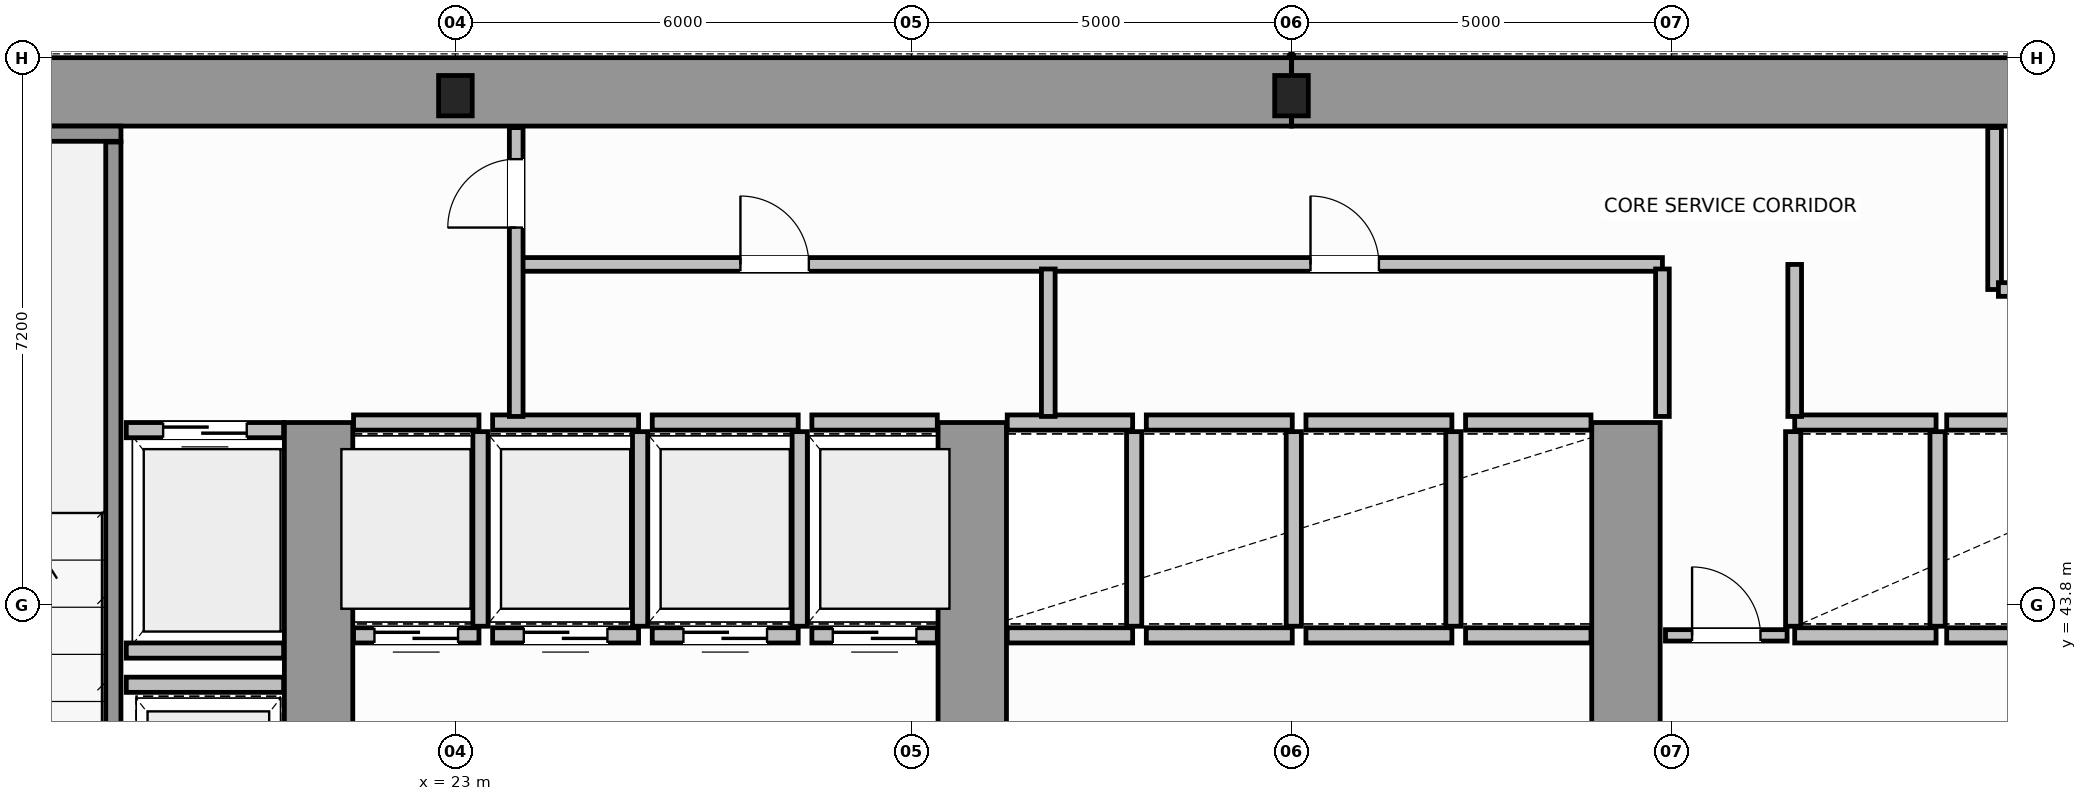
"""IFC4 building model, lengths in metres.
Left out: names, types, materials, properties, quantities, classifications, styles, units other than length and angle.
Written with IfcOpenShell. Run it as: python <this file> out.ifc"""

import sys

from ifc_helpers import new_model, si_unit, direction, frame, frame_2d, origin, origin_2d, place, context, subcontext, project, spatial, rectangle, i_section, extrude, source, transform, mapped, element, fill, save


model = new_model("IFC4")
c1 = context("Model", 3, precision=1e-05, world=origin(), true_north=direction((0.0, 1.0)))
c2 = subcontext(c1, "Body", "Model", "MODEL_VIEW")
j1 = project(units=[si_unit("LENGTHUNIT", "METRE"), si_unit("PLANEANGLEUNIT", "RADIAN")], contexts=[c1])
p1 = place(None, origin())
s1 = spatial("IfcSite", under=j1, at=p1, CompositionType="ELEMENT")
p2 = place(p1, origin())
s2 = spatial("IfcBuilding", under=s1, at=p2, CompositionType="ELEMENT")
p3 = place(p2, frame((0.0, 0.0, 75.8)))
s3 = spatial("IfcBuildingStorey", under=s2, at=p3, CompositionType="ELEMENT", Elevation=75.8)
m1 = source(origin(), c2, "Body", "SweptSolid", [
    extrude(i_section(OverallWidth=0.442, OverallDepth=0.531, WebThickness=0.065, FlangeThickness=0.076, FilletRadius=0.015, at=origin_2d()), origin(), (0.0, 0.0, 1.0), 3.8),
])
for number, where, z_axis, x_axis in (
    (1, (23.0, 50.5, 0.0), (0.0, 0.0, 1.0), (1.0, 0.0, 0.0)),
    (2, (34.0, 50.5, 0.0), (0.0, 0.0, 1.0), (1.0, 0.0, 0.0)),
):
    element("IfcColumn", number, at=place(p3, frame(where, z_axis=z_axis, x_axis=x_axis)), inside=s3, PredefinedType="COLUMN", context=c2, shape_type="MappedRepresentation", body=[
        mapped(m1, transform((0.0, 0.0, 0.0), scale=1.0)),
    ])
for number, where, z_axis, x_axis in (
    (3, (14.454, 50.55, 0.0), (0.0, 0.0, 1.0), (1.0, 0.0, 0.0)),
    (4, (34.002, 50.55, 0.0), (0.0, 0.0, 1.0), (1.0, 0.0, 0.0)),
):
    element("IfcWall", number, at=place(p3, frame(where, z_axis=z_axis, x_axis=x_axis)), inside=s3, PredefinedType="SHEAR", context=c2, shape_type="SweptSolid", body=[
        extrude(rectangle(XDim=19.544, YDim=0.9, at=frame_2d((9.772, 0.0))), origin(), (0.0, 0.0, 1.0), 3.8),
    ])
for number, where, z_axis, x_axis in (
    (5, (21.2, 36.97, 0.0), (0.0, 0.0, 1.0), (0.0, 1.0, 0.0)),
    (6, (29.8, 36.97, 0.0), (0.0, 0.0, 1.0), (0.0, 1.0, 0.0)),
    (7, (38.4, 36.97, 0.0), (0.0, 0.0, 1.0), (0.0, 1.0, 0.0)),
):
    element("IfcWall", number, at=place(p3, frame(where, z_axis=z_axis, x_axis=x_axis)), inside=s3, PredefinedType="SHEAR", context=c2, shape_type="SweptSolid", body=[
        extrude(rectangle(XDim=9.23, YDim=0.9, at=frame_2d((4.615, 0.0))), origin(), (0.0, 0.0, 1.0), 3.8),
    ])
p4 = place(p3, frame((14.45, 50.0, 0.0), z_axis=(0.0, 0.0, 1.0), x_axis=(1.0, 0.0, 0.0)))
e8 = element("IfcWall", 8, at=p4, inside=s3, PredefinedType="SOLIDWALL", context=c2, shape_type="SweptSolid", body=[
    extrude(rectangle(XDim=4.15, YDim=0.2, at=frame_2d((2.075, 0.0))), origin(), (0.0, 0.0, 1.0), 3.8),
])
p5 = place(p3, frame((18.5, 39.96, 0.0), z_axis=(0.0, 0.0, 1.0), x_axis=(0.0, 1.0, 0.0)))
e9 = element("IfcWall", 9, at=p5, inside=s3, PredefinedType="SOLIDWALL", context=c2, shape_type="SweptSolid", body=[
    extrude(rectangle(XDim=9.93, YDim=0.2, at=frame_2d((4.965, 0.0))), origin(), (0.0, 0.0, 1.0), 3.8),
])
p6 = place(p3, frame((21.66, 43.4, 0.0), z_axis=(0.0, 0.0, 1.0), x_axis=(1.0, 0.0, 0.0)))
e10 = element("IfcWall", 10, at=p6, inside=s3, PredefinedType="SOLIDWALL", context=c2, shape_type="SweptSolid", body=[
    extrude(rectangle(XDim=1.65, YDim=0.2, at=frame_2d((0.825, 0.0))), origin(), (0.0, 0.0, 1.0), 3.58),
])
p7 = place(p6, frame((0.275, 0.0, 0.0)))
e11 = element("IfcOpeningElement", 11, at=p7, cuts=e10, PredefinedType="OPENING", context=c2, shape_type="SweptSolid", body=[
    extrude(rectangle(XDim=1.1, YDim=2.15, at=frame_2d((0.55, 1.075))), frame((0.0, 0.11, 0.0), z_axis=(0.0, -1.0, 0.0), x_axis=(1.0, 0.0, 0.0)), (0.0, 0.0, 1.0), 0.22),
])
p8 = place(p3, frame((21.66, 46.2, 0.0), z_axis=(0.0, 0.0, 1.0), x_axis=(1.0, 0.0, 0.0)))
e12 = element("IfcWall", 12, at=p8, inside=s3, PredefinedType="SOLIDWALL", context=c2, shape_type="SweptSolid", body=[
    extrude(rectangle(XDim=1.65, YDim=0.2, at=frame_2d((0.825, 0.0))), origin(), (0.0, 0.0, 1.0), 3.58),
])
p9 = place(p3, frame((23.33, 43.52, 0.0), z_axis=(0.0, 0.0, 1.0), x_axis=(0.0, 1.0, 0.0)))
e13 = element("IfcWall", 13, at=p9, inside=s3, PredefinedType="SOLIDWALL", context=c2, shape_type="SweptSolid", body=[
    extrude(rectangle(XDim=2.56, YDim=0.2, at=frame_2d((1.28, 0.0))), origin(), (0.0, 0.0, 1.0), 3.58),
])
p10 = place(p3, frame((23.49, 43.4, 0.0), z_axis=(0.0, 0.0, 1.0), x_axis=(1.0, 0.0, 0.0)))
e14 = element("IfcWall", 14, at=p10, inside=s3, PredefinedType="SOLIDWALL", context=c2, shape_type="SweptSolid", body=[
    extrude(rectangle(XDim=1.92, YDim=0.2, at=frame_2d((0.96, 0.0))), origin(), (0.0, 0.0, 1.0), 3.58),
])
p11 = place(p10, frame((0.41, 0.0, 0.0)))
e15 = element("IfcOpeningElement", 15, at=p11, cuts=e14, PredefinedType="OPENING", context=c2, shape_type="SweptSolid", body=[
    extrude(rectangle(XDim=1.1, YDim=2.15, at=frame_2d((0.55, 1.075))), frame((0.0, 0.11, 0.0), z_axis=(0.0, -1.0, 0.0), x_axis=(1.0, 0.0, 0.0)), (0.0, 0.0, 1.0), 0.22),
])
p12 = place(p3, frame((23.49, 46.2, 0.0), z_axis=(0.0, 0.0, 1.0), x_axis=(1.0, 0.0, 0.0)))
e16 = element("IfcWall", 16, at=p12, inside=s3, PredefinedType="SOLIDWALL", context=c2, shape_type="SweptSolid", body=[
    extrude(rectangle(XDim=1.92, YDim=0.2, at=frame_2d((0.96, 0.0))), origin(), (0.0, 0.0, 1.0), 3.58),
])
p13 = place(p3, frame((25.43, 43.52, 0.0), z_axis=(0.0, 0.0, 1.0), x_axis=(0.0, 1.0, 0.0)))
e17 = element("IfcWall", 17, at=p13, inside=s3, PredefinedType="SOLIDWALL", context=c2, shape_type="SweptSolid", body=[
    extrude(rectangle(XDim=2.56, YDim=0.2, at=frame_2d((1.28, 0.0))), origin(), (0.0, 0.0, 1.0), 3.58),
])
p14 = place(p3, frame((25.59, 43.4, 0.0), z_axis=(0.0, 0.0, 1.0), x_axis=(1.0, 0.0, 0.0)))
e18 = element("IfcWall", 18, at=p14, inside=s3, PredefinedType="SOLIDWALL", context=c2, shape_type="SweptSolid", body=[
    extrude(rectangle(XDim=1.92, YDim=0.2, at=frame_2d((0.96, 0.0))), origin(), (0.0, 0.0, 1.0), 3.58),
])
p15 = place(p14, frame((0.41, 0.0, 0.0)))
e19 = element("IfcOpeningElement", 19, at=p15, cuts=e18, PredefinedType="OPENING", context=c2, shape_type="SweptSolid", body=[
    extrude(rectangle(XDim=1.1, YDim=2.15, at=frame_2d((0.55, 1.075))), frame((0.0, 0.11, 0.0), z_axis=(0.0, -1.0, 0.0), x_axis=(1.0, 0.0, 0.0)), (0.0, 0.0, 1.0), 0.22),
])
p16 = place(p3, frame((25.59, 46.2, 0.0), z_axis=(0.0, 0.0, 1.0), x_axis=(1.0, 0.0, 0.0)))
e20 = element("IfcWall", 20, at=p16, inside=s3, PredefinedType="SOLIDWALL", context=c2, shape_type="SweptSolid", body=[
    extrude(rectangle(XDim=1.92, YDim=0.2, at=frame_2d((0.96, 0.0))), origin(), (0.0, 0.0, 1.0), 3.58),
])
p17 = place(p3, frame((27.53, 43.52, 0.0), z_axis=(0.0, 0.0, 1.0), x_axis=(0.0, 1.0, 0.0)))
e21 = element("IfcWall", 21, at=p17, inside=s3, PredefinedType="SOLIDWALL", context=c2, shape_type="SweptSolid", body=[
    extrude(rectangle(XDim=2.56, YDim=0.2, at=frame_2d((1.28, 0.0))), origin(), (0.0, 0.0, 1.0), 3.58),
])
p18 = place(p3, frame((27.69, 43.4, 0.0), z_axis=(0.0, 0.0, 1.0), x_axis=(1.0, 0.0, 0.0)))
e22 = element("IfcWall", 22, at=p18, inside=s3, PredefinedType="SOLIDWALL", context=c2, shape_type="SweptSolid", body=[
    extrude(rectangle(XDim=1.65, YDim=0.2, at=frame_2d((0.825, 0.0))), origin(), (0.0, 0.0, 1.0), 3.58),
])
p19 = place(p18, frame((0.275, 0.0, 0.0)))
e23 = element("IfcOpeningElement", 23, at=p19, cuts=e22, PredefinedType="OPENING", context=c2, shape_type="SweptSolid", body=[
    extrude(rectangle(XDim=1.1, YDim=2.15, at=frame_2d((0.55, 1.075))), frame((0.0, 0.11, 0.0), z_axis=(0.0, -1.0, 0.0), x_axis=(1.0, 0.0, 0.0)), (0.0, 0.0, 1.0), 0.22),
])
p20 = place(p3, frame((27.69, 46.2, 0.0), z_axis=(0.0, 0.0, 1.0), x_axis=(1.0, 0.0, 0.0)))
e24 = element("IfcWall", 24, at=p20, inside=s3, PredefinedType="SOLIDWALL", context=c2, shape_type="SweptSolid", body=[
    extrude(rectangle(XDim=1.65, YDim=0.2, at=frame_2d((0.825, 0.0))), origin(), (0.0, 0.0, 1.0), 3.58),
])
for number, where, z_axis, x_axis in (
    (25, (30.26, 43.4, 0.0), (0.0, 0.0, 1.0), (1.0, 0.0, 0.0)),
    (26, (30.26, 46.2, 0.0), (0.0, 0.0, 1.0), (1.0, 0.0, 0.0)),
):
    element("IfcWall", number, at=place(p3, frame(where, z_axis=z_axis, x_axis=x_axis)), inside=s3, PredefinedType="SOLIDWALL", context=c2, shape_type="SweptSolid", body=[
        extrude(rectangle(XDim=1.65, YDim=0.2, at=frame_2d((0.825, 0.0))), origin(), (0.0, 0.0, 1.0), 3.58),
    ])
p21 = place(p3, frame((31.93, 43.52, 0.0), z_axis=(0.0, 0.0, 1.0), x_axis=(0.0, 1.0, 0.0)))
e27 = element("IfcWall", 27, at=p21, inside=s3, PredefinedType="SOLIDWALL", context=c2, shape_type="SweptSolid", body=[
    extrude(rectangle(XDim=2.56, YDim=0.2, at=frame_2d((1.28, 0.0))), origin(), (0.0, 0.0, 1.0), 3.58),
])
for number, where, z_axis, x_axis in (
    (28, (32.09, 43.4, 0.0), (0.0, 0.0, 1.0), (1.0, 0.0, 0.0)),
    (29, (32.09, 46.2, 0.0), (0.0, 0.0, 1.0), (1.0, 0.0, 0.0)),
):
    element("IfcWall", number, at=place(p3, frame(where, z_axis=z_axis, x_axis=x_axis)), inside=s3, PredefinedType="SOLIDWALL", context=c2, shape_type="SweptSolid", body=[
        extrude(rectangle(XDim=1.92, YDim=0.2, at=frame_2d((0.96, 0.0))), origin(), (0.0, 0.0, 1.0), 3.58),
    ])
p22 = place(p3, frame((34.03, 43.52, 0.0), z_axis=(0.0, 0.0, 1.0), x_axis=(0.0, 1.0, 0.0)))
e30 = element("IfcWall", 30, at=p22, inside=s3, PredefinedType="SOLIDWALL", context=c2, shape_type="SweptSolid", body=[
    extrude(rectangle(XDim=2.56, YDim=0.2, at=frame_2d((1.28, 0.0))), origin(), (0.0, 0.0, 1.0), 3.58),
])
for number, where, z_axis, x_axis in (
    (31, (34.19, 43.4, 0.0), (0.0, 0.0, 1.0), (1.0, 0.0, 0.0)),
    (32, (34.19, 46.2, 0.0), (0.0, 0.0, 1.0), (1.0, 0.0, 0.0)),
):
    element("IfcWall", number, at=place(p3, frame(where, z_axis=z_axis, x_axis=x_axis)), inside=s3, PredefinedType="SOLIDWALL", context=c2, shape_type="SweptSolid", body=[
        extrude(rectangle(XDim=1.92, YDim=0.2, at=frame_2d((0.96, 0.0))), origin(), (0.0, 0.0, 1.0), 3.58),
    ])
p23 = place(p3, frame((36.13, 43.52, 0.0), z_axis=(0.0, 0.0, 1.0), x_axis=(0.0, 1.0, 0.0)))
e33 = element("IfcWall", 33, at=p23, inside=s3, PredefinedType="SOLIDWALL", context=c2, shape_type="SweptSolid", body=[
    extrude(rectangle(XDim=2.56, YDim=0.2, at=frame_2d((1.28, 0.0))), origin(), (0.0, 0.0, 1.0), 3.58),
])
for number, where, z_axis, x_axis in (
    (34, (36.29, 43.4, 0.0), (0.0, 0.0, 1.0), (1.0, 0.0, 0.0)),
    (35, (36.29, 46.2, 0.0), (0.0, 0.0, 1.0), (1.0, 0.0, 0.0)),
):
    element("IfcWall", number, at=place(p3, frame(where, z_axis=z_axis, x_axis=x_axis)), inside=s3, PredefinedType="SOLIDWALL", context=c2, shape_type="SweptSolid", body=[
        extrude(rectangle(XDim=1.65, YDim=0.2, at=frame_2d((0.825, 0.0))), origin(), (0.0, 0.0, 1.0), 3.58),
    ])
for number, where, z_axis, x_axis in (
    (36, (40.62, 43.4, 0.0), (0.0, 0.0, 1.0), (1.0, 0.0, 0.0)),
    (37, (40.62, 46.2, 0.0), (0.0, 0.0, 1.0), (1.0, 0.0, 0.0)),
):
    element("IfcWall", number, at=place(p3, frame(where, z_axis=z_axis, x_axis=x_axis)), inside=s3, PredefinedType="SOLIDWALL", context=c2, shape_type="SweptSolid", body=[
        extrude(rectangle(XDim=1.86, YDim=0.2, at=frame_2d((0.93, 0.0))), origin(), (0.0, 0.0, 1.0), 3.58),
    ])
for number, where, z_axis, x_axis in (
    (38, (40.6, 43.52, 0.0), (0.0, 0.0, 1.0), (0.0, 1.0, 0.0)),
    (39, (42.5, 43.52, 0.0), (0.0, 0.0, 1.0), (0.0, 1.0, 0.0)),
):
    element("IfcWall", number, at=place(p3, frame(where, z_axis=z_axis, x_axis=x_axis)), inside=s3, PredefinedType="SOLIDWALL", context=c2, shape_type="SweptSolid", body=[
        extrude(rectangle(XDim=2.56, YDim=0.2, at=frame_2d((1.28, 0.0))), origin(), (0.0, 0.0, 1.0), 3.58),
    ])
for number, where, z_axis, x_axis in (
    (40, (42.62, 43.4, 0.0), (0.0, 0.0, 1.0), (1.0, 0.0, 0.0)),
    (41, (42.62, 46.2, 0.0), (0.0, 0.0, 1.0), (1.0, 0.0, 0.0)),
):
    element("IfcWall", number, at=place(p3, frame(where, z_axis=z_axis, x_axis=x_axis)), inside=s3, PredefinedType="SOLIDWALL", context=c2, shape_type="SweptSolid", body=[
        extrude(rectangle(XDim=1.86, YDim=0.2, at=frame_2d((0.93, 0.0))), origin(), (0.0, 0.0, 1.0), 3.58),
    ])
p24 = place(p3, frame((18.67, 46.1, 0.0), z_axis=(0.0, 0.0, 1.0), x_axis=(1.0, 0.0, 0.0)))
e42 = element("IfcWall", 42, at=p24, inside=s3, PredefinedType="SOLIDWALL", context=c2, shape_type="SweptSolid", body=[
    extrude(rectangle(XDim=2.07, YDim=0.2, at=frame_2d((1.035, 0.0))), origin(), (0.0, 0.0, 1.0), 3.58),
])
p25 = place(p24, frame((0.485, 0.0, 0.0)))
e43 = element("IfcOpeningElement", 43, at=p25, cuts=e42, PredefinedType="OPENING", context=c2, shape_type="SweptSolid", body=[
    extrude(rectangle(XDim=1.1, YDim=2.15, at=frame_2d((0.55, 1.075))), frame((0.0, 0.11, 0.0), z_axis=(0.0, -1.0, 0.0), x_axis=(1.0, 0.0, 0.0)), (0.0, 0.0, 1.0), 0.22),
])
for number, where, z_axis, x_axis in (
    (44, (18.67, 43.2, 0.0), (0.0, 0.0, 1.0), (1.0, 0.0, 0.0)),
    (45, (18.67, 42.75, 0.0), (0.0, 0.0, 1.0), (1.0, 0.0, 0.0)),
):
    element("IfcWall", number, at=place(p3, frame(where, z_axis=z_axis, x_axis=x_axis)), inside=s3, PredefinedType="SOLIDWALL", context=c2, shape_type="SweptSolid", body=[
        extrude(rectangle(XDim=2.07, YDim=0.2, at=frame_2d((1.035, 0.0))), origin(), (0.0, 0.0, 1.0), 3.58),
    ])
p26 = place(p3, frame((38.92, 43.4, 0.0), z_axis=(0.0, 0.0, 1.0), x_axis=(1.0, 0.0, 0.0)))
e46 = element("IfcWall", 46, at=p26, inside=s3, PredefinedType="PARTITIONING", context=c2, shape_type="SweptSolid", body=[
    extrude(rectangle(XDim=1.6, YDim=0.15, at=frame_2d((0.8, 0.0))), origin(), (0.0, 0.0, 1.0), 3.58),
])
p27 = place(p26, frame((0.35, 0.0, 0.0)))
e47 = element("IfcOpeningElement", 47, at=p27, cuts=e46, PredefinedType="OPENING", context=c2, shape_type="SweptSolid", body=[
    extrude(rectangle(XDim=0.9, YDim=2.1, at=frame_2d((0.45, 1.05))), frame((0.0, 0.085, 0.0), z_axis=(0.0, -1.0, 0.0), x_axis=(1.0, 0.0, 0.0)), (0.0, 0.0, 1.0), 0.17),
])
p28 = place(p3, frame((23.85, 48.28, 0.0), z_axis=(0.0, 0.0, 1.0), x_axis=(1.0, 0.0, 0.0)))
e48 = element("IfcWall", 48, at=p28, inside=s3, PredefinedType="PLUMBINGWALL", context=c2, shape_type="SweptSolid", body=[
    extrude(rectangle(XDim=15.03, YDim=0.18, at=frame_2d((7.515, 0.0))), origin(), (0.0, 0.0, 1.0), 3.58),
])
p29 = place(p28, frame((2.9, 0.0, 0.0)))
e49 = element("IfcOpeningElement", 49, at=p29, cuts=e48, PredefinedType="OPENING", context=c2, shape_type="SweptSolid", body=[
    extrude(rectangle(XDim=0.9, YDim=2.15, at=frame_2d((0.45, 1.075))), frame((0.0, 0.1, 0.0), z_axis=(0.0, -1.0, 0.0), x_axis=(1.0, 0.0, 0.0)), (0.0, 0.0, 1.0), 0.2),
])
p30 = place(p28, frame((10.4, 0.0, 0.0)))
e50 = element("IfcOpeningElement", 50, at=p30, cuts=e48, PredefinedType="OPENING", context=c2, shape_type="SweptSolid", body=[
    extrude(rectangle(XDim=0.9, YDim=2.15, at=frame_2d((0.45, 1.075))), frame((0.0, 0.1, 0.0), z_axis=(0.0, -1.0, 0.0), x_axis=(1.0, 0.0, 0.0)), (0.0, 0.0, 1.0), 0.2),
])
p31 = place(p3, frame((23.8, 46.28, 0.0), z_axis=(0.0, 0.0, 1.0), x_axis=(0.0, 1.0, 0.0)))
e51 = element("IfcWall", 51, at=p31, inside=s3, PredefinedType="PLUMBINGWALL", context=c2, shape_type="SweptSolid", body=[
    extrude(rectangle(XDim=3.8, YDim=0.18, at=frame_2d((1.9, 0.0))), origin(), (0.0, 0.0, 1.0), 3.58),
])
p32 = place(p31, frame((2.485, 0.0, 0.0)))
e52 = element("IfcOpeningElement", 52, at=p32, cuts=e51, PredefinedType="OPENING", context=c2, shape_type="SweptSolid", body=[
    extrude(rectangle(XDim=0.9, YDim=2.15, at=frame_2d((0.45, 1.075))), frame((0.0, 0.1, 0.0), z_axis=(0.0, -1.0, 0.0), x_axis=(1.0, 0.0, 0.0)), (0.0, 0.0, 1.0), 0.2),
])
for number, where, z_axis, x_axis in (
    (53, (30.8, 46.28, 0.0), (0.0, 0.0, 1.0), (0.0, 1.0, 0.0)),
    (54, (38.88, 46.28, 0.0), (0.0, 0.0, 1.0), (0.0, 1.0, 0.0)),
):
    element("IfcWall", number, at=place(p3, frame(where, z_axis=z_axis, x_axis=x_axis)), inside=s3, PredefinedType="PLUMBINGWALL", context=c2, shape_type="SweptSolid", body=[
        extrude(rectangle(XDim=1.94, YDim=0.18, at=frame_2d((0.97, 0.0))), origin(), (0.0, 0.0, 1.0), 3.58),
    ])
p33 = place(p3, frame((40.62, 46.28, 0.0), z_axis=(0.0, 0.0, 1.0), x_axis=(0.0, 1.0, 0.0)))
e55 = element("IfcWall", 55, at=p33, inside=s3, PredefinedType="PLUMBINGWALL", context=c2, shape_type="SweptSolid", body=[
    extrude(rectangle(XDim=2.0, YDim=0.18, at=frame_2d((1.0, 0.0))), origin(), (0.0, 0.0, 1.0), 3.58),
])
p34 = place(p3, frame((43.25, 47.95, 0.0), z_axis=(0.0, 0.0, 1.0), x_axis=(0.0, 1.0, 0.0)))
e56 = element("IfcWall", 56, at=p34, inside=s3, PredefinedType="PLUMBINGWALL", context=c2, shape_type="SweptSolid", body=[
    extrude(rectangle(XDim=2.13, YDim=0.18, at=frame_2d((1.065, 0.0))), origin(), (0.0, 0.0, 1.0), 3.58),
])
p35 = place(p3, frame((43.3, 47.95, 0.0), z_axis=(0.0, 0.0, 1.0), x_axis=(1.0, 0.0, 0.0)))
e57 = element("IfcWall", 57, at=p35, inside=s3, PredefinedType="PLUMBINGWALL", context=c2, shape_type="SweptSolid", body=[
    extrude(rectangle(XDim=6.08, YDim=0.18, at=frame_2d((3.04, 0.0))), origin(), (0.0, 0.0, 1.0), 3.58),
])
p36 = place(p35, frame((2.4, 0.0, 0.0)))
e58 = element("IfcOpeningElement", 58, at=p36, cuts=e57, PredefinedType="OPENING", context=c2, shape_type="SweptSolid", body=[
    extrude(rectangle(XDim=0.9, YDim=2.15, at=frame_2d((0.45, 1.075))), frame((0.0, 0.1, 0.0), z_axis=(0.0, -1.0, 0.0), x_axis=(1.0, 0.0, 0.0)), (0.0, 0.0, 1.0), 0.2),
])
m2 = source(origin(), c2, "Body", "SweptSolid", [
    extrude(rectangle(XDim=1.1, YDim=2.15, at=frame_2d((0.55, 1.075))), frame((0.0, 0.025, 0.0), z_axis=(0.0, -1.0, 0.0), x_axis=(1.0, 0.0, 0.0)), (0.0, 0.0, 1.0), 0.05),
])
p37 = place(p7, origin())
e59 = element("IfcDoor", 59, at=p37, inside=s3, OperationType="DOUBLE_DOOR_SLIDING", PredefinedType="DOOR", context=c2, shape_type="MappedRepresentation", body=[
    mapped(m2, transform((0.0, 0.0, 0.0), scale=1.0)),
])
fill(e11, e59)
p38 = place(p11, origin())
e60 = element("IfcDoor", 60, at=p38, inside=s3, OperationType="DOUBLE_DOOR_SLIDING", PredefinedType="DOOR", context=c2, shape_type="MappedRepresentation", body=[
    mapped(m2, transform((0.0, 0.0, 0.0), scale=1.0)),
])
fill(e15, e60)
p39 = place(p15, origin())
e61 = element("IfcDoor", 61, at=p39, inside=s3, OperationType="DOUBLE_DOOR_SLIDING", PredefinedType="DOOR", context=c2, shape_type="MappedRepresentation", body=[
    mapped(m2, transform((0.0, 0.0, 0.0), scale=1.0)),
])
fill(e19, e61)
p40 = place(p19, origin())
e62 = element("IfcDoor", 62, at=p40, inside=s3, OperationType="DOUBLE_DOOR_SLIDING", PredefinedType="DOOR", context=c2, shape_type="MappedRepresentation", body=[
    mapped(m2, transform((0.0, 0.0, 0.0), scale=1.0)),
])
fill(e23, e62)
p41 = place(p25, origin())
e63 = element("IfcDoor", 63, at=p41, inside=s3, OperationType="DOUBLE_DOOR_SLIDING", PredefinedType="DOOR", context=c2, shape_type="MappedRepresentation", body=[
    mapped(m2, transform((0.0, 0.0, 0.0), scale=1.0)),
])
fill(e43, e63)
m3 = source(origin(), c2, "Body", "SweptSolid", [
    extrude(rectangle(XDim=0.9, YDim=2.1, at=frame_2d((0.45, 1.05))), frame((0.0, 0.025, 0.0), z_axis=(0.0, -1.0, 0.0), x_axis=(1.0, 0.0, 0.0)), (0.0, 0.0, 1.0), 0.05),
])
p42 = place(p27, origin())
e64 = element("IfcDoor", 64, at=p42, inside=s3, OperationType="SINGLE_SWING_LEFT", PredefinedType="DOOR", context=c2, shape_type="MappedRepresentation", body=[
    mapped(m3, transform((0.0, 0.0, 0.0), scale=1.0)),
])
fill(e47, e64)
m4 = source(origin(), c2, "Body", "SweptSolid", [
    extrude(rectangle(XDim=0.9, YDim=2.15, at=frame_2d((0.45, 1.075))), frame((0.0, 0.025, 0.0), z_axis=(0.0, -1.0, 0.0), x_axis=(1.0, 0.0, 0.0)), (0.0, 0.0, 1.0), 0.05),
])
p43 = place(p32, origin())
e65 = element("IfcDoor", 65, at=p43, inside=s3, OperationType="SINGLE_SWING_LEFT", PredefinedType="DOOR", context=c2, shape_type="MappedRepresentation", body=[
    mapped(m4, transform((0.0, 0.0, 0.0), scale=1.0)),
])
fill(e52, e65)
p44 = place(p29, origin())
e66 = element("IfcDoor", 66, at=p44, inside=s3, OperationType="SINGLE_SWING_RIGHT", PredefinedType="DOOR", context=c2, shape_type="MappedRepresentation", body=[
    mapped(m4, transform((0.0, 0.0, 0.0), scale=1.0)),
])
fill(e49, e66)
p45 = place(p30, origin())
e67 = element("IfcDoor", 67, at=p45, inside=s3, OperationType="SINGLE_SWING_LEFT", PredefinedType="DOOR", context=c2, shape_type="MappedRepresentation", body=[
    mapped(m4, transform((0.0, 0.0, 0.0), scale=1.0)),
])
fill(e50, e67)
save(model, sys.argv[1])
